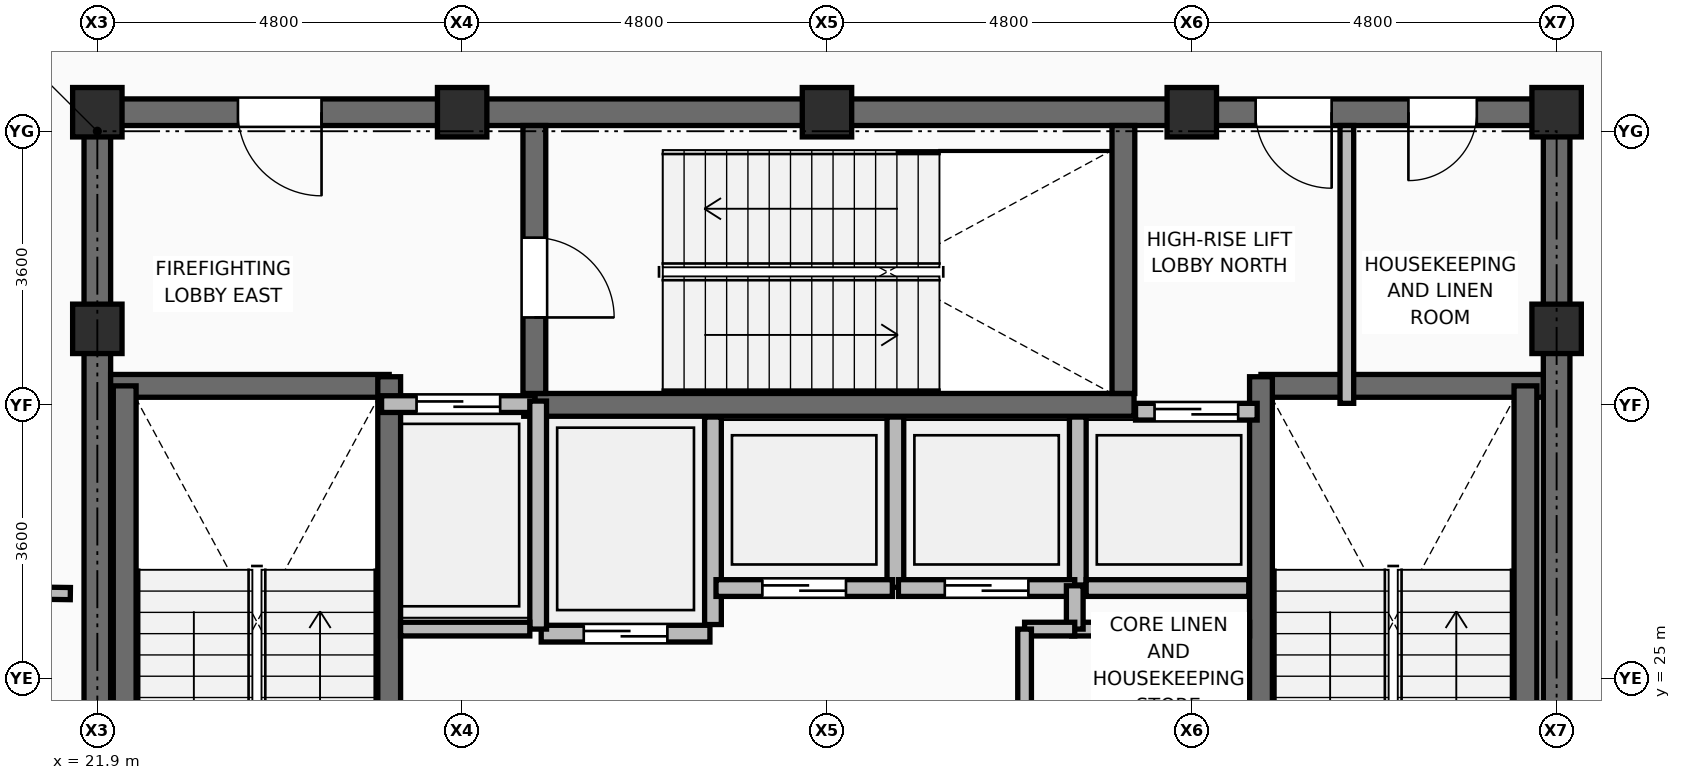
"""IFC4 building model, lengths in metres.
Left out: names, types, materials, properties, quantities, classifications, styles, units other than length and angle.
Written with IfcOpenShell. Run it as: python <this file> out.ifc"""

import sys

from ifc_helpers import new_model, si_unit, direction, frame, frame_2d, origin, origin_2d, place, context, subcontext, project, spatial, rectangle, extrude, element, fill, save


model = new_model("IFC4")
c1 = context("Model", 3, precision=1e-05, world=origin(), true_north=direction((0.0, 1.0)))
c2 = subcontext(c1, "Body", "Model", "MODEL_VIEW")
j1 = project(units=[si_unit("LENGTHUNIT", "METRE"), si_unit("PLANEANGLEUNIT", "RADIAN")], contexts=[c1])
p1 = place(None, origin())
s1 = spatial("IfcSite", under=j1, at=p1, CompositionType="ELEMENT")
p2 = place(p1, origin())
s2 = spatial("IfcBuilding", under=s1, at=p2, CompositionType="ELEMENT")
p3 = place(p2, frame((0.0, 0.0, 259.05)))
s3 = spatial("IfcBuildingStorey", under=s2, at=p3, CompositionType="ELEMENT", Elevation=259.05)
for number, where, z_axis, x_axis in (
    (1, (21.9, 29.6, 0.0), (0.0, 0.0, 1.0), (1.0, 0.0, 0.0)),
    (2, (41.1, 29.6, 0.0), (0.0, 0.0, 1.0), (1.0, 0.0, 0.0)),
    (3, (21.9, 32.45, 0.0), (0.0, 0.0, 1.0), (1.0, 0.0, 0.0)),
    (4, (26.7, 32.45, 0.0), (0.0, 0.0, 1.0), (1.0, 0.0, 0.0)),
    (5, (31.5, 32.45, 0.0), (0.0, 0.0, 1.0), (1.0, 0.0, 0.0)),
    (6, (36.3, 32.45, 0.0), (0.0, 0.0, 1.0), (1.0, 0.0, 0.0)),
    (7, (41.1, 32.45, 0.0), (0.0, 0.0, 1.0), (1.0, 0.0, 0.0)),
):
    element("IfcColumn", number, at=place(p3, frame(where, z_axis=z_axis, x_axis=x_axis)), inside=s3, PredefinedType="COLUMN", context=c2, shape_type="SweptSolid", body=[
        extrude(rectangle(XDim=0.65, YDim=0.65, at=origin_2d()), origin(), (0.0, 0.0, 1.0), 4.8),
    ])
p4 = place(p3, frame((30.0, 25.71, 0.0), z_axis=(0.0, 0.0, 1.0), x_axis=(0.0, 1.0, 0.0)))
e8 = element("IfcWall", 8, at=p4, inside=s3, PredefinedType="PARTITIONING", context=c2, shape_type="SweptSolid", body=[
    extrude(rectangle(XDim=2.73, YDim=0.22, at=frame_2d((1.365, 0.0))), origin(), (0.0, 0.0, 1.0), 4.595),
])
p5 = place(p3, frame((32.4, 26.2, 0.0), z_axis=(0.0, 0.0, 1.0), x_axis=(0.0, 1.0, 0.0)))
e9 = element("IfcWall", 9, at=p5, inside=s3, PredefinedType="PARTITIONING", context=c2, shape_type="SweptSolid", body=[
    extrude(rectangle(XDim=2.24, YDim=0.22, at=frame_2d((1.12, 0.0))), origin(), (0.0, 0.0, 1.0), 4.595),
])
p6 = place(p3, frame((34.8, 26.23, 0.0), z_axis=(0.0, 0.0, 1.0), x_axis=(0.0, 1.0, 0.0)))
e10 = element("IfcWall", 10, at=p6, inside=s3, PredefinedType="PARTITIONING", context=c2, shape_type="SweptSolid", body=[
    extrude(rectangle(XDim=2.21, YDim=0.22, at=frame_2d((1.105, 0.0))), origin(), (0.0, 0.0, 1.0), 4.595),
])
p7 = place(p3, frame((34.91, 26.19, 0.0), z_axis=(0.0, 0.0, 1.0), x_axis=(1.0, 0.0, 0.0)))
e11 = element("IfcWall", 11, at=p7, inside=s3, PredefinedType="PARTITIONING", context=c2, shape_type="SweptSolid", body=[
    extrude(rectangle(XDim=2.14, YDim=0.22, at=frame_2d((1.07, 0.0))), origin(), (0.0, 0.0, 1.0), 4.595),
])
p8 = place(p3, frame((21.725, 32.45, 0.0), z_axis=(0.0, 0.0, 1.0), x_axis=(1.0, 0.0, 0.0)))
e12 = element("IfcWall", 12, at=p8, inside=s3, PredefinedType="SHEAR", context=c2, shape_type="SweptSolid", body=[
    extrude(rectangle(XDim=19.55, YDim=0.35, at=frame_2d((9.775, 0.0))), origin(), (0.0, 0.0, 1.0), 4.62),
])
p9 = place(p8, frame((2.025, 0.0, 0.0)))
e13 = element("IfcOpeningElement", 13, at=p9, cuts=e12, PredefinedType="OPENING", context=c2, shape_type="SweptSolid", body=[
    extrude(rectangle(XDim=1.1, YDim=2.1, at=frame_2d((0.55, 1.05))), frame((0.0, 0.185, 0.0), z_axis=(0.0, -1.0, 0.0), x_axis=(1.0, 0.0, 0.0)), (0.0, 0.0, 1.0), 0.37),
])
p10 = place(p8, frame((15.415, 0.0, 0.0)))
e14 = element("IfcOpeningElement", 14, at=p10, cuts=e12, PredefinedType="OPENING", context=c2, shape_type="SweptSolid", body=[
    extrude(rectangle(XDim=1.0, YDim=2.1, at=frame_2d((0.5, 1.05))), frame((0.0, 0.185, 0.0), z_axis=(0.0, -1.0, 0.0), x_axis=(1.0, 0.0, 0.0)), (0.0, 0.0, 1.0), 0.37),
])
p11 = place(p8, frame((17.425, 0.0, 0.0)))
e15 = element("IfcOpeningElement", 15, at=p11, cuts=e12, PredefinedType="OPENING", context=c2, shape_type="SweptSolid", body=[
    extrude(rectangle(XDim=0.9, YDim=2.1, at=frame_2d((0.45, 1.05))), frame((0.0, 0.185, 0.0), z_axis=(0.0, -1.0, 0.0), x_axis=(1.0, 0.0, 0.0)), (0.0, 0.0, 1.0), 0.37),
])
p12 = place(p3, frame((21.9, 17.975, 0.0), z_axis=(0.0, 0.0, 1.0), x_axis=(0.0, 1.0, 0.0)))
e16 = element("IfcWall", 16, at=p12, inside=s3, PredefinedType="SHEAR", context=c2, shape_type="SweptSolid", body=[
    extrude(rectangle(XDim=14.3, YDim=0.35, at=frame_2d((7.15, 0.0))), origin(), (0.0, 0.0, 1.0), 4.62),
])
p13 = place(p3, frame((41.1, 17.975, 0.0), z_axis=(0.0, 0.0, 1.0), x_axis=(0.0, 1.0, 0.0)))
e17 = element("IfcWall", 17, at=p13, inside=s3, PredefinedType="SHEAR", context=c2, shape_type="SweptSolid", body=[
    extrude(rectangle(XDim=14.3, YDim=0.35, at=frame_2d((7.15, 0.0))), origin(), (0.0, 0.0, 1.0), 4.62),
])
p14 = place(p13, frame((3.485, 0.0, 0.0)))
e18 = element("IfcOpeningElement", 18, at=p14, cuts=e17, PredefinedType="OPENING", context=c2, shape_type="SweptSolid", body=[
    extrude(rectangle(XDim=1.05, YDim=2.1, at=frame_2d((0.525, 1.05))), frame((0.0, 0.185, 0.0), z_axis=(0.0, -1.0, 0.0), x_axis=(1.0, 0.0, 0.0)), (0.0, 0.0, 1.0), 0.37),
])
p15 = place(p3, frame((22.075, 28.85, 0.0), z_axis=(0.0, 0.0, 1.0), x_axis=(1.0, 0.0, 0.0)))
e19 = element("IfcWall", 19, at=p15, inside=s3, PredefinedType="SHEAR", context=c2, shape_type="SweptSolid", body=[
    extrude(rectangle(XDim=3.665, YDim=0.3, at=frame_2d((1.833, 0.0))), origin(), (0.0, 0.0, 1.0), 4.62),
])
p16 = place(p3, frame((25.74, 20.98, 0.0), z_axis=(0.0, 0.0, 1.0), x_axis=(0.0, 1.0, 0.0)))
e20 = element("IfcWall", 20, at=p16, inside=s3, PredefinedType="SHEAR", context=c2, shape_type="SweptSolid", body=[
    extrude(rectangle(XDim=7.99, YDim=0.3, at=frame_2d((3.995, 0.0))), origin(), (0.0, 0.0, 1.0), 4.62),
])
p17 = place(p3, frame((22.26, 21.1, 0.0), z_axis=(0.0, 0.0, 1.0), x_axis=(0.0, 1.0, 0.0)))
e21 = element("IfcWall", 21, at=p17, inside=s3, PredefinedType="SHEAR", context=c2, shape_type="SweptSolid", body=[
    extrude(rectangle(XDim=7.75, YDim=0.3, at=frame_2d((3.875, 0.0))), origin(), (0.0, 0.0, 1.0), 4.62),
])
p18 = place(p3, frame((37.21, 28.85, 0.0), z_axis=(0.0, 0.0, 1.0), x_axis=(1.0, 0.0, 0.0)))
e22 = element("IfcWall", 22, at=p18, inside=s3, PredefinedType="SHEAR", context=c2, shape_type="SweptSolid", body=[
    extrude(rectangle(XDim=3.715, YDim=0.3, at=frame_2d((1.857, 0.0))), origin(), (0.0, 0.0, 1.0), 4.62),
])
p19 = place(p3, frame((37.21, 20.98, 0.0), z_axis=(0.0, 0.0, 1.0), x_axis=(0.0, 1.0, 0.0)))
e23 = element("IfcWall", 23, at=p19, inside=s3, PredefinedType="SHEAR", context=c2, shape_type="SweptSolid", body=[
    extrude(rectangle(XDim=7.99, YDim=0.3, at=frame_2d((3.995, 0.0))), origin(), (0.0, 0.0, 1.0), 4.62),
])
p20 = place(p3, frame((40.69, 22.65, 0.0), z_axis=(0.0, 0.0, 1.0), x_axis=(0.0, 1.0, 0.0)))
e24 = element("IfcWall", 24, at=p20, inside=s3, PredefinedType="SHEAR", context=c2, shape_type="SweptSolid", body=[
    extrude(rectangle(XDim=6.2, YDim=0.3, at=frame_2d((3.1, 0.0))), origin(), (0.0, 0.0, 1.0), 4.62),
])
p21 = place(p3, frame((27.51, 28.6, 0.0), z_axis=(0.0, 0.0, 1.0), x_axis=(1.0, 0.0, 0.0)))
e25 = element("IfcWall", 25, at=p21, inside=s3, PredefinedType="SHEAR", context=c2, shape_type="SweptSolid", body=[
    extrude(rectangle(XDim=8.03, YDim=0.3, at=frame_2d((4.015, 0.0))), origin(), (0.0, 0.0, 1.0), 4.62),
])
p22 = place(p3, frame((27.65, 28.75, 0.0), z_axis=(0.0, 0.0, 1.0), x_axis=(0.0, 1.0, 0.0)))
e26 = element("IfcWall", 26, at=p22, inside=s3, PredefinedType="SHEAR", context=c2, shape_type="SweptSolid", body=[
    extrude(rectangle(XDim=3.525, YDim=0.3, at=frame_2d((1.762, 0.0))), origin(), (0.0, 0.0, 1.0), 4.62),
])
p23 = place(p22, frame((1.0, 0.0, 0.0)))
e27 = element("IfcOpeningElement", 27, at=p23, cuts=e26, PredefinedType="OPENING", context=c2, shape_type="SweptSolid", body=[
    extrude(rectangle(XDim=1.05, YDim=2.1, at=frame_2d((0.525, 1.05))), frame((0.0, 0.16, 0.0), z_axis=(0.0, -1.0, 0.0), x_axis=(1.0, 0.0, 0.0)), (0.0, 0.0, 1.0), 0.32),
])
p24 = place(p3, frame((35.4, 28.75, 0.0), z_axis=(0.0, 0.0, 1.0), x_axis=(0.0, 1.0, 0.0)))
e28 = element("IfcWall", 28, at=p24, inside=s3, PredefinedType="SHEAR", context=c2, shape_type="SweptSolid", body=[
    extrude(rectangle(XDim=3.525, YDim=0.3, at=frame_2d((1.762, 0.0))), origin(), (0.0, 0.0, 1.0), 4.62),
])
p25 = place(p3, frame((25.64, 28.61, 0.0), z_axis=(0.0, 0.0, 1.0), x_axis=(1.0, 0.0, 0.0)))
e29 = element("IfcWall", 29, at=p25, inside=s3, PredefinedType="PARTITIONING", context=c2, shape_type="SweptSolid", body=[
    extrude(rectangle(XDim=2.02, YDim=0.22, at=frame_2d((1.01, 0.0))), origin(), (0.0, 0.0, 1.0), 4.6),
])
p26 = place(p25, frame((0.46, 0.0, 0.0)))
e30 = element("IfcOpeningElement", 30, at=p26, cuts=e29, PredefinedType="OPENING", context=c2, shape_type="SweptSolid", body=[
    extrude(rectangle(XDim=1.1, YDim=2.2, at=frame_2d((0.55, 1.1))), frame((0.0, 0.12, 0.0), z_axis=(0.0, -1.0, 0.0), x_axis=(1.0, 0.0, 0.0)), (0.0, 0.0, 1.0), 0.24),
])
p27 = place(p3, frame((27.74, 25.59, 0.0), z_axis=(0.0, 0.0, 1.0), x_axis=(1.0, 0.0, 0.0)))
e31 = element("IfcWall", 31, at=p27, inside=s3, PredefinedType="PARTITIONING", context=c2, shape_type="SweptSolid", body=[
    extrude(rectangle(XDim=2.22, YDim=0.22, at=frame_2d((1.11, 0.0))), origin(), (0.0, 0.0, 1.0), 4.6),
])
p28 = place(p27, frame((0.56, 0.0, 0.0)))
e32 = element("IfcOpeningElement", 32, at=p28, cuts=e31, PredefinedType="OPENING", context=c2, shape_type="SweptSolid", body=[
    extrude(rectangle(XDim=1.1, YDim=2.2, at=frame_2d((0.55, 1.1))), frame((0.0, 0.12, 0.0), z_axis=(0.0, -1.0, 0.0), x_axis=(1.0, 0.0, 0.0)), (0.0, 0.0, 1.0), 0.24),
])
p29 = place(p3, frame((30.04, 26.19, 0.0), z_axis=(0.0, 0.0, 1.0), x_axis=(1.0, 0.0, 0.0)))
e33 = element("IfcWall", 33, at=p29, inside=s3, PredefinedType="PARTITIONING", context=c2, shape_type="SweptSolid", body=[
    extrude(rectangle(XDim=2.32, YDim=0.22, at=frame_2d((1.16, 0.0))), origin(), (0.0, 0.0, 1.0), 4.6),
])
p30 = place(p29, frame((0.61, 0.0, 0.0)))
e34 = element("IfcOpeningElement", 34, at=p30, cuts=e33, PredefinedType="OPENING", context=c2, shape_type="SweptSolid", body=[
    extrude(rectangle(XDim=1.1, YDim=2.2, at=frame_2d((0.55, 1.1))), frame((0.0, 0.12, 0.0), z_axis=(0.0, -1.0, 0.0), x_axis=(1.0, 0.0, 0.0)), (0.0, 0.0, 1.0), 0.24),
])
p31 = place(p3, frame((32.44, 26.19, 0.0), z_axis=(0.0, 0.0, 1.0), x_axis=(1.0, 0.0, 0.0)))
e35 = element("IfcWall", 35, at=p31, inside=s3, PredefinedType="PARTITIONING", context=c2, shape_type="SweptSolid", body=[
    extrude(rectangle(XDim=2.32, YDim=0.22, at=frame_2d((1.16, 0.0))), origin(), (0.0, 0.0, 1.0), 4.6),
])
p32 = place(p31, frame((0.61, 0.0, 0.0)))
e36 = element("IfcOpeningElement", 36, at=p32, cuts=e35, PredefinedType="OPENING", context=c2, shape_type="SweptSolid", body=[
    extrude(rectangle(XDim=1.1, YDim=2.2, at=frame_2d((0.55, 1.1))), frame((0.0, 0.12, 0.0), z_axis=(0.0, -1.0, 0.0), x_axis=(1.0, 0.0, 0.0)), (0.0, 0.0, 1.0), 0.24),
])
p33 = place(p3, frame((35.56, 28.51, 0.0), z_axis=(0.0, 0.0, 1.0), x_axis=(1.0, 0.0, 0.0)))
e37 = element("IfcWall", 37, at=p33, inside=s3, PredefinedType="PARTITIONING", context=c2, shape_type="SweptSolid", body=[
    extrude(rectangle(XDim=1.6, YDim=0.22, at=frame_2d((0.8, 0.0))), origin(), (0.0, 0.0, 1.0), 4.6),
])
p34 = place(p33, frame((0.25, 0.0, 0.0)))
e38 = element("IfcOpeningElement", 38, at=p34, cuts=e37, PredefinedType="OPENING", context=c2, shape_type="SweptSolid", body=[
    extrude(rectangle(XDim=1.1, YDim=2.2, at=frame_2d((0.55, 1.1))), frame((0.0, 0.12, 0.0), z_axis=(0.0, -1.0, 0.0), x_axis=(1.0, 0.0, 0.0)), (0.0, 0.0, 1.0), 0.24),
])
p35 = place(p3, frame((27.7, 25.65, 0.0), z_axis=(0.0, 0.0, 1.0), x_axis=(0.0, 1.0, 0.0)))
e39 = element("IfcWall", 39, at=p35, inside=s3, PredefinedType="PARTITIONING", context=c2, shape_type="SweptSolid", body=[
    extrude(rectangle(XDim=3.0, YDim=0.22, at=frame_2d((1.5, 0.0))), origin(), (0.0, 0.0, 1.0), 4.6),
])
p36 = place(p3, frame((25.89, 25.65, 0.0), z_axis=(0.0, 0.0, 1.0), x_axis=(1.0, 0.0, 0.0)))
e40 = element("IfcWall", 40, at=p36, inside=s3, PredefinedType="PARTITIONING", context=c2, shape_type="SweptSolid", body=[
    extrude(rectangle(XDim=1.7, YDim=0.18, at=frame_2d((0.85, 0.0))), origin(), (0.0, 0.0, 1.0), 4.6),
])
p37 = place(p3, frame((34.72, 25.65, 0.0), z_axis=(0.0, 0.0, 1.0), x_axis=(1.0, 0.0, 0.0)))
e41 = element("IfcWall", 41, at=p37, inside=s3, PredefinedType="PARTITIONING", context=c2, shape_type="SweptSolid", body=[
    extrude(rectangle(XDim=2.34, YDim=0.18, at=frame_2d((1.17, 0.0))), origin(), (0.0, 0.0, 1.0), 4.6),
])
p38 = place(p3, frame((34.76, 25.65, 0.0), z_axis=(0.0, 0.0, 1.0), x_axis=(0.0, 1.0, 0.0)))
e42 = element("IfcWall", 42, at=p38, inside=s3, PredefinedType="PARTITIONING", context=c2, shape_type="SweptSolid", body=[
    extrude(rectangle(XDim=0.57, YDim=0.22, at=frame_2d((0.285, 0.0))), origin(), (0.0, 0.0, 1.0), 4.6),
])
p39 = place(p3, frame((34.1, 25.65, 0.0), z_axis=(0.0, 0.0, 1.0), x_axis=(1.0, 0.0, 0.0)))
e43 = element("IfcWall", 43, at=p39, inside=s3, PredefinedType="PARTITIONING", context=c2, shape_type="SweptSolid", body=[
    extrude(rectangle(XDim=0.66, YDim=0.18, at=frame_2d((0.33, 0.0))), origin(), (0.0, 0.0, 1.0), 4.6),
])
p40 = place(p3, frame((34.1, 21.1, 0.0), z_axis=(0.0, 0.0, 1.0), x_axis=(0.0, 1.0, 0.0)))
e44 = element("IfcWall", 44, at=p40, inside=s3, PredefinedType="PARTITIONING", context=c2, shape_type="SweptSolid", body=[
    extrude(rectangle(XDim=4.55, YDim=0.18, at=frame_2d((2.275, 0.0))), origin(), (0.0, 0.0, 1.0), 4.6),
])
p41 = place(p40, frame((1.825, 0.0, 0.0)))
e45 = element("IfcOpeningElement", 45, at=p41, cuts=e44, PredefinedType="OPENING", context=c2, shape_type="SweptSolid", body=[
    extrude(rectangle(XDim=0.9, YDim=2.1, at=frame_2d((0.45, 1.05))), frame((0.0, 0.1, 0.0), z_axis=(0.0, -1.0, 0.0), x_axis=(1.0, 0.0, 0.0)), (0.0, 0.0, 1.0), 0.2),
])
p42 = place(p3, frame((38.34, 28.62, 0.0), z_axis=(0.0, 0.0, 1.0), x_axis=(0.0, 1.0, 0.0)))
e46 = element("IfcWall", 46, at=p42, inside=s3, PredefinedType="PARTITIONING", context=c2, shape_type="SweptSolid", body=[
    extrude(rectangle(XDim=3.655, YDim=0.18, at=frame_2d((1.827, 0.0))), origin(), (0.0, 0.0, 1.0), 4.182),
])
p43 = place(p3, frame((21.545, 26.117, 0.0), z_axis=(0.0, 0.0, 1.0), x_axis=(-0.999908513059, 0.0135264745, 0.0)))
e47 = element("IfcWall", 47, at=p43, inside=s3, PredefinedType="PARTITIONING", context=c2, shape_type="SweptSolid", body=[
    extrude(rectangle(XDim=1.859, YDim=0.16, at=frame_2d((0.93, 0.0))), origin(), (0.0, 0.0, 1.0), 3.645),
])
p44 = place(p23, frame((1.05, 0.0, 0.0), z_axis=(0.0, 0.0, 1.0), x_axis=(-1.0, 0.0, 0.0)))
e48 = element("IfcDoor", 48, at=p44, inside=s3, OperationType="SINGLE_SWING_RIGHT", PredefinedType="DOOR", context=c2, shape_type="SweptSolid", body=[
    extrude(rectangle(XDim=1.05, YDim=2.1, at=frame_2d((0.525, 1.05))), frame((0.0, 0.025, 0.0), z_axis=(0.0, -1.0, 0.0), x_axis=(1.0, 0.0, 0.0)), (0.0, 0.0, 1.0), 0.05),
])
fill(e27, e48)
p45 = place(p26, origin())
e49 = element("IfcDoor", 49, at=p45, inside=s3, OperationType="DOUBLE_DOOR_SLIDING", PredefinedType="DOOR", context=c2, shape_type="SweptSolid", body=[
    extrude(rectangle(XDim=1.1, YDim=2.2, at=frame_2d((0.55, 1.1))), frame((0.0, 0.025, 0.0), z_axis=(0.0, -1.0, 0.0), x_axis=(1.0, 0.0, 0.0)), (0.0, 0.0, 1.0), 0.05),
])
fill(e30, e49)
p46 = place(p28, frame((1.1, 0.0, 0.0), z_axis=(0.0, 0.0, 1.0), x_axis=(-1.0, 0.0, 0.0)))
e50 = element("IfcDoor", 50, at=p46, inside=s3, OperationType="DOUBLE_DOOR_SLIDING", PredefinedType="DOOR", context=c2, shape_type="SweptSolid", body=[
    extrude(rectangle(XDim=1.1, YDim=2.2, at=frame_2d((0.55, 1.1))), frame((0.0, 0.025, 0.0), z_axis=(0.0, -1.0, 0.0), x_axis=(1.0, 0.0, 0.0)), (0.0, 0.0, 1.0), 0.05),
])
fill(e32, e50)
p47 = place(p30, frame((1.1, 0.0, 0.0), z_axis=(0.0, 0.0, 1.0), x_axis=(-1.0, 0.0, 0.0)))
e51 = element("IfcDoor", 51, at=p47, inside=s3, OperationType="DOUBLE_DOOR_SLIDING", PredefinedType="DOOR", context=c2, shape_type="SweptSolid", body=[
    extrude(rectangle(XDim=1.1, YDim=2.2, at=frame_2d((0.55, 1.1))), frame((0.0, 0.025, 0.0), z_axis=(0.0, -1.0, 0.0), x_axis=(1.0, 0.0, 0.0)), (0.0, 0.0, 1.0), 0.05),
])
fill(e34, e51)
p48 = place(p32, frame((1.1, 0.0, 0.0), z_axis=(0.0, 0.0, 1.0), x_axis=(-1.0, 0.0, 0.0)))
e52 = element("IfcDoor", 52, at=p48, inside=s3, OperationType="DOUBLE_DOOR_SLIDING", PredefinedType="DOOR", context=c2, shape_type="SweptSolid", body=[
    extrude(rectangle(XDim=1.1, YDim=2.2, at=frame_2d((0.55, 1.1))), frame((0.0, 0.025, 0.0), z_axis=(0.0, -1.0, 0.0), x_axis=(1.0, 0.0, 0.0)), (0.0, 0.0, 1.0), 0.05),
])
fill(e36, e52)
p49 = place(p34, origin())
e53 = element("IfcDoor", 53, at=p49, inside=s3, OperationType="DOUBLE_DOOR_SLIDING", PredefinedType="DOOR", context=c2, shape_type="SweptSolid", body=[
    extrude(rectangle(XDim=1.1, YDim=2.2, at=frame_2d((0.55, 1.1))), frame((0.0, 0.025, 0.0), z_axis=(0.0, -1.0, 0.0), x_axis=(1.0, 0.0, 0.0)), (0.0, 0.0, 1.0), 0.05),
])
fill(e38, e53)
p50 = place(p9, frame((1.1, 0.0, 0.0), z_axis=(0.0, 0.0, 1.0), x_axis=(-1.0, 0.0, 0.0)))
e54 = element("IfcDoor", 54, at=p50, inside=s3, OperationType="SINGLE_SWING_LEFT", PredefinedType="DOOR", context=c2, shape_type="SweptSolid", body=[
    extrude(rectangle(XDim=1.1, YDim=2.1, at=frame_2d((0.55, 1.05))), frame((0.0, 0.025, 0.0), z_axis=(0.0, -1.0, 0.0), x_axis=(1.0, 0.0, 0.0)), (0.0, 0.0, 1.0), 0.05),
])
fill(e13, e54)
p51 = place(p10, frame((1.0, 0.0, 0.0), z_axis=(0.0, 0.0, 1.0), x_axis=(-1.0, 0.0, 0.0)))
e55 = element("IfcDoor", 55, at=p51, inside=s3, OperationType="SINGLE_SWING_LEFT", PredefinedType="DOOR", context=c2, shape_type="SweptSolid", body=[
    extrude(rectangle(XDim=1.0, YDim=2.1, at=frame_2d((0.5, 1.05))), frame((0.0, 0.025, 0.0), z_axis=(0.0, -1.0, 0.0), x_axis=(1.0, 0.0, 0.0)), (0.0, 0.0, 1.0), 0.05),
])
fill(e14, e55)
p52 = place(p11, frame((0.9, 0.0, 0.0), z_axis=(0.0, 0.0, 1.0), x_axis=(-1.0, 0.0, 0.0)))
e56 = element("IfcDoor", 56, at=p52, inside=s3, OperationType="SINGLE_SWING_RIGHT", PredefinedType="DOOR", context=c2, shape_type="SweptSolid", body=[
    extrude(rectangle(XDim=0.9, YDim=2.1, at=frame_2d((0.45, 1.05))), frame((0.0, 0.025, 0.0), z_axis=(0.0, -1.0, 0.0), x_axis=(1.0, 0.0, 0.0)), (0.0, 0.0, 1.0), 0.05),
])
fill(e15, e56)
save(model, sys.argv[1])
